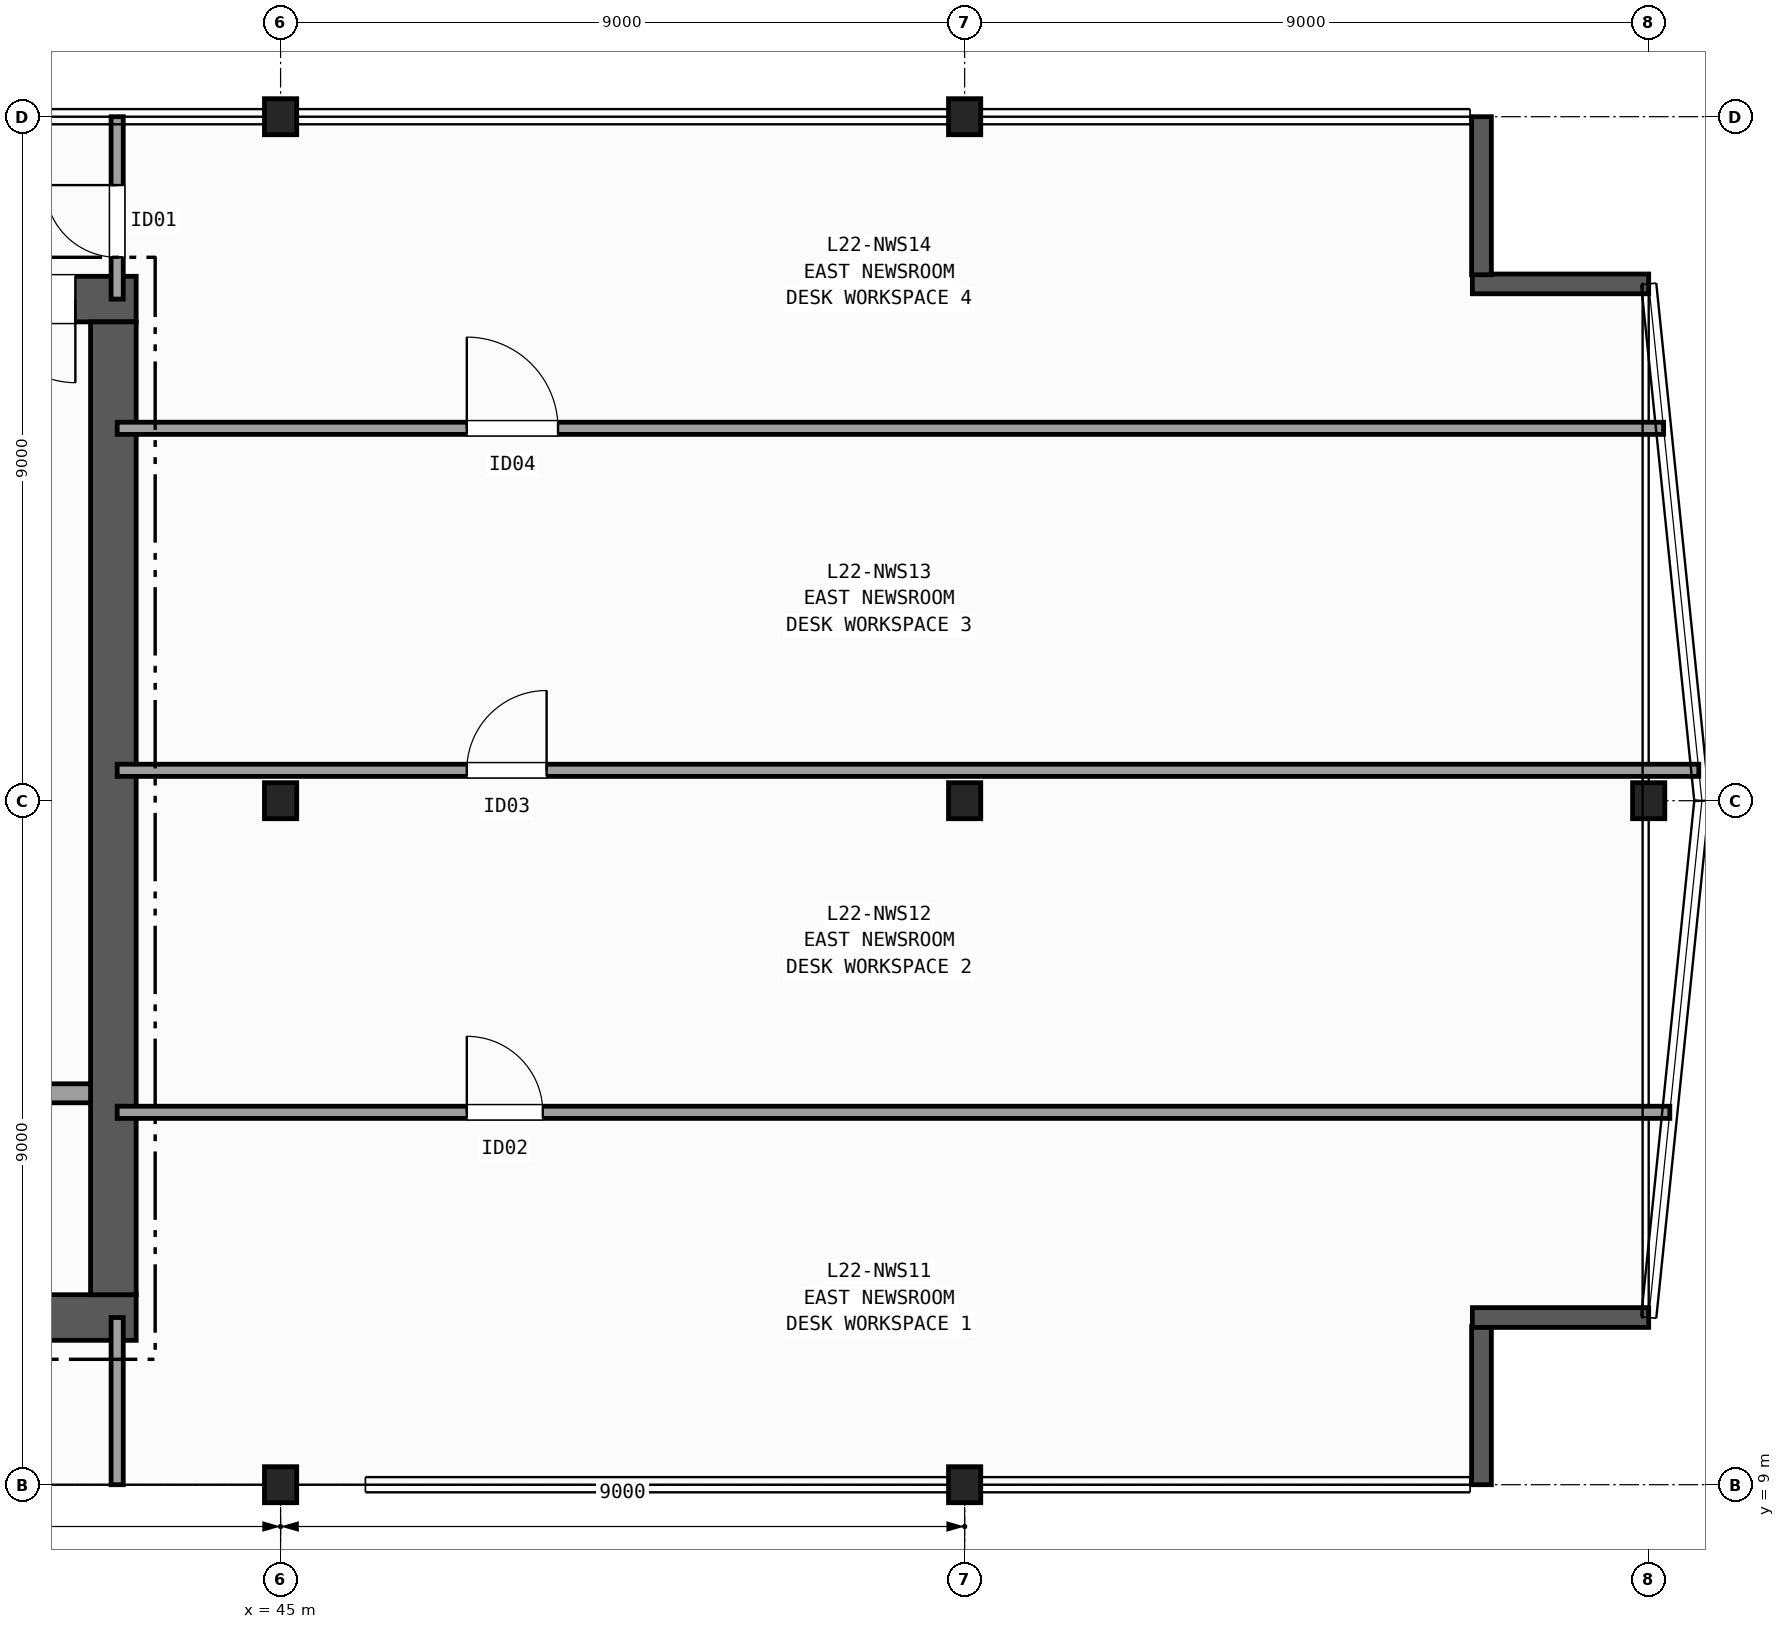
"""IFC4 building model, lengths in metres.
Left out: names, types, materials, properties, quantities, classifications, styles, units other than length and angle.
Written with IfcOpenShell. Run it as: python <this file> out.ifc"""

import sys

from ifc_helpers import new_model, si_unit, direction, frame, frame_2d, origin, origin_2d, place, context, subcontext, project, spatial, rectangle, i_section, extrude, element, fill, save


model = new_model("IFC4")
c1 = context("Model", 3, precision=1e-05, world=origin(), true_north=direction((0.0, 1.0)))
c2 = subcontext(c1, "Body", "Model", "MODEL_VIEW")
j1 = project(units=[si_unit("LENGTHUNIT", "METRE"), si_unit("PLANEANGLEUNIT", "RADIAN")], contexts=[c1])
p1 = place(None, origin())
s1 = spatial("IfcSite", under=j1, at=p1, CompositionType="ELEMENT")
p2 = place(p1, origin())
s2 = spatial("IfcBuilding", under=s1, at=p2, CompositionType="ELEMENT")
p3 = place(p2, frame((0.0, 0.0, 92.8)))
s3 = spatial("IfcBuildingStorey", under=s2, at=p3, CompositionType="ELEMENT", Elevation=92.8)
for number, where, z_axis, x_axis in (
    (1, (45.0, 9.0, 0.0), (0.0, 0.0, 1.0), (1.0, 0.0, 0.0)),
    (2, (45.0, 18.0, 0.0), (0.0, 0.0, 1.0), (1.0, 0.0, 0.0)),
    (3, (45.0, 27.0, 0.0), (0.0, 0.0, 1.0), (1.0, 0.0, 0.0)),
    (4, (54.0, 9.0, 0.0), (0.0, 0.0, 1.0), (1.0, 0.0, 0.0)),
    (5, (54.0, 18.0, 0.0), (0.0, 0.0, 1.0), (1.0, 0.0, 0.0)),
    (6, (54.0, 27.0, 0.0), (0.0, 0.0, 1.0), (1.0, 0.0, 0.0)),
    (7, (63.0, 18.0, 0.0), (0.0, 0.0, 1.0), (1.0, 0.0, 0.0)),
):
    element("IfcColumn", number, at=place(p3, frame(where, z_axis=z_axis, x_axis=x_axis)), inside=s3, PredefinedType="COLUMN", context=c2, shape_type="SweptSolid", body=[
        extrude(i_section(OverallWidth=0.424, OverallDepth=0.474, WebThickness=0.048, FlangeThickness=0.077, FilletRadius=0.015, at=origin_2d()), origin(), (0.0, 0.0, 1.0), 3.7),
    ])
p4 = place(p3, frame((60.8, 9.0, 0.0), z_axis=(0.0, 0.0, 1.0), x_axis=(0.0, 1.0, 0.0)))
e8 = element("IfcWall", 8, at=p4, inside=s3, PredefinedType="SOLIDWALL", context=c2, shape_type="SweptSolid", body=[
    extrude(rectangle(XDim=2.08, YDim=0.26, at=frame_2d((1.04, 0.0))), origin(), (0.0, 0.0, 1.0), 3.42),
])
for number, where, z_axis, x_axis in (
    (9, (60.68, 11.2, 0.0), (0.0, 0.0, 1.0), (1.0, 0.0, 0.0)),
    (10, (63.0, 24.8, 0.0), (0.0, 0.0, 1.0), (-1.0, 0.0, 0.0)),
):
    element("IfcWall", number, at=place(p3, frame(where, z_axis=z_axis, x_axis=x_axis)), inside=s3, PredefinedType="SOLIDWALL", context=c2, shape_type="SweptSolid", body=[
        extrude(rectangle(XDim=2.32, YDim=0.26, at=frame_2d((1.16, 0.0))), origin(), (0.0, 0.0, 1.0), 3.42),
    ])
p5 = place(p3, frame((60.8, 24.92, 0.0), z_axis=(0.0, 0.0, 1.0), x_axis=(0.0, 1.0, 0.0)))
e11 = element("IfcWall", 11, at=p5, inside=s3, PredefinedType="SOLIDWALL", context=c2, shape_type="SweptSolid", body=[
    extrude(rectangle(XDim=2.08, YDim=0.26, at=frame_2d((1.04, 0.0))), origin(), (0.0, 0.0, 1.0), 3.42),
])
p6 = place(p3, frame((29.1, 11.2, 0.0), z_axis=(0.0, 0.0, 1.0), x_axis=(1.0, 0.0, 0.0)))
e12 = element("IfcWall", 12, at=p6, inside=s3, PredefinedType="SHEAR", context=c2, shape_type="SweptSolid", body=[
    extrude(rectangle(XDim=14.0, YDim=0.6, at=frame_2d((7.0, 0.0))), origin(), (0.0, 0.0, 1.0), 3.42),
])
p7 = place(p3, frame((43.1, 24.6, 0.0), z_axis=(0.0, 0.0, 1.0), x_axis=(-1.0, 0.0, 0.0)))
e13 = element("IfcWall", 13, at=p7, inside=s3, PredefinedType="SHEAR", context=c2, shape_type="SweptSolid", body=[
    extrude(rectangle(XDim=14.0, YDim=0.6, at=frame_2d((7.0, 0.0))), origin(), (0.0, 0.0, 1.0), 3.42),
])
p8 = place(p7, frame((0.8, 0.0, 0.0)))
e14 = element("IfcOpeningElement", 14, at=p8, cuts=e13, PredefinedType="OPENING", context=c2, shape_type="SweptSolid", body=[
    extrude(rectangle(XDim=1.1, YDim=2.15, at=frame_2d((0.55, 1.075))), frame((0.0, 0.31, 0.0), z_axis=(0.0, -1.0, 0.0), x_axis=(1.0, 0.0, 0.0)), (0.0, 0.0, 1.0), 0.62),
])
p9 = place(p7, frame((2.75, 0.0, 0.0)))
e15 = element("IfcOpeningElement", 15, at=p9, cuts=e13, PredefinedType="OPENING", context=c2, shape_type="SweptSolid", body=[
    extrude(rectangle(XDim=0.9, YDim=2.1, at=frame_2d((0.45, 1.05))), frame((0.0, 0.31, 0.0), z_axis=(0.0, -1.0, 0.0), x_axis=(1.0, 0.0, 0.0)), (0.0, 0.0, 1.0), 0.62),
])
p10 = place(p7, frame((4.65, 0.0, 0.0)))
e16 = element("IfcOpeningElement", 16, at=p10, cuts=e13, PredefinedType="OPENING", context=c2, shape_type="SweptSolid", body=[
    extrude(rectangle(XDim=0.9, YDim=2.1, at=frame_2d((0.45, 1.05))), frame((0.0, 0.31, 0.0), z_axis=(0.0, -1.0, 0.0), x_axis=(1.0, 0.0, 0.0)), (0.0, 0.0, 1.0), 0.62),
])
p11 = place(p3, frame((42.8, 11.5, 0.0), z_axis=(0.0, 0.0, 1.0), x_axis=(0.0, 1.0, 0.0)))
e17 = element("IfcWall", 17, at=p11, inside=s3, PredefinedType="SHEAR", context=c2, shape_type="SweptSolid", body=[
    extrude(rectangle(XDim=12.8, YDim=0.6, at=frame_2d((6.4, 0.0))), origin(), (0.0, 0.0, 1.0), 3.42),
])
p12 = place(p3, frame((33.07, 14.15, 0.0), z_axis=(0.0, 0.0, 1.0), x_axis=(1.0, 0.0, 0.0)))
e18 = element("IfcWall", 18, at=p12, inside=s3, PredefinedType="PARTITIONING", context=c2, shape_type="SweptSolid", body=[
    extrude(rectangle(XDim=9.43, YDim=0.25, at=frame_2d((4.715, 0.0))), origin(), (0.0, 0.0, 1.0), 3.42),
])
p13 = place(p12, frame((0.755, 0.0, 0.0)))
e19 = element("IfcOpeningElement", 19, at=p13, cuts=e18, PredefinedType="OPENING", context=c2, shape_type="SweptSolid", body=[
    extrude(rectangle(XDim=1.15, YDim=2.15, at=frame_2d((0.575, 1.075))), frame((0.0, 0.135, 0.0), z_axis=(0.0, -1.0, 0.0), x_axis=(1.0, 0.0, 0.0)), (0.0, 0.0, 1.0), 0.27),
])
p14 = place(p12, frame((3.355, 0.0, 0.0)))
e20 = element("IfcOpeningElement", 20, at=p14, cuts=e18, PredefinedType="OPENING", context=c2, shape_type="SweptSolid", body=[
    extrude(rectangle(XDim=1.15, YDim=2.15, at=frame_2d((0.575, 1.075))), frame((0.0, 0.135, 0.0), z_axis=(0.0, -1.0, 0.0), x_axis=(1.0, 0.0, 0.0)), (0.0, 0.0, 1.0), 0.27),
])
p15 = place(p3, frame((42.85, 9.0, 0.0), z_axis=(0.0, 0.0, 1.0), x_axis=(0.0, 1.0, 0.0)))
e21 = element("IfcWall", 21, at=p15, inside=s3, PredefinedType="PARTITIONING", context=c2, shape_type="SweptSolid", body=[
    extrude(rectangle(XDim=2.2, YDim=0.16, at=frame_2d((1.1, 0.0))), origin(), (0.0, 0.0, 1.0), 2.627),
])
p16 = place(p3, frame((42.85, 24.6, 0.0), z_axis=(0.0, 0.0, 1.0), x_axis=(0.0, 1.0, 0.0)))
e22 = element("IfcWall", 22, at=p16, inside=s3, PredefinedType="PARTITIONING", context=c2, shape_type="SweptSolid", body=[
    extrude(rectangle(XDim=2.4, YDim=0.16, at=frame_2d((1.2, 0.0))), origin(), (0.0, 0.0, 1.0), 2.627),
])
p17 = place(p16, frame((0.55, 0.0, 0.0)))
e23 = element("IfcOpeningElement", 23, at=p17, cuts=e22, PredefinedType="OPENING", context=c2, shape_type="SweptSolid", body=[
    extrude(rectangle(XDim=0.95, YDim=2.1, at=frame_2d((0.475, 1.05))), frame((0.0, 0.09, 0.0), z_axis=(0.0, -1.0, 0.0), x_axis=(1.0, 0.0, 0.0)), (0.0, 0.0, 1.0), 0.18),
])
p18 = place(p3, frame((42.85, 13.9, 0.0), z_axis=(0.0, 0.0, 1.0), x_axis=(1.0, 0.0, 0.0)))
e24 = element("IfcWall", 24, at=p18, inside=s3, PredefinedType="PARTITIONING", context=c2, shape_type="SweptSolid", body=[
    extrude(rectangle(XDim=20.428, YDim=0.16, at=frame_2d((10.214, 0.0))), origin(), (0.0, 0.0, 1.0), 3.42),
])
p19 = place(p18, frame((4.6, 0.0, 0.0)))
e25 = element("IfcOpeningElement", 25, at=p19, cuts=e24, PredefinedType="OPENING", context=c2, shape_type="SweptSolid", body=[
    extrude(rectangle(XDim=1.0, YDim=2.1, at=frame_2d((0.5, 1.05))), frame((0.0, 0.09, 0.0), z_axis=(0.0, -1.0, 0.0), x_axis=(1.0, 0.0, 0.0)), (0.0, 0.0, 1.0), 0.18),
])
p20 = place(p3, frame((42.85, 18.4, 0.0), z_axis=(0.0, 0.0, 1.0), x_axis=(1.0, 0.0, 0.0)))
e26 = element("IfcWall", 26, at=p20, inside=s3, PredefinedType="PARTITIONING", context=c2, shape_type="SweptSolid", body=[
    extrude(rectangle(XDim=20.809, YDim=0.16, at=frame_2d((10.404, 0.0))), origin(), (0.0, 0.0, 1.0), 3.42),
])
p21 = place(p20, frame((4.6, 0.0, 0.0)))
e27 = element("IfcOpeningElement", 27, at=p21, cuts=e26, PredefinedType="OPENING", context=c2, shape_type="SweptSolid", body=[
    extrude(rectangle(XDim=1.05, YDim=2.15, at=frame_2d((0.525, 1.075))), frame((0.0, 0.09, 0.0), z_axis=(0.0, -1.0, 0.0), x_axis=(1.0, 0.0, 0.0)), (0.0, 0.0, 1.0), 0.18),
])
p22 = place(p3, frame((42.85, 22.9, 0.0), z_axis=(0.0, 0.0, 1.0), x_axis=(1.0, 0.0, 0.0)))
e28 = element("IfcWall", 28, at=p22, inside=s3, PredefinedType="PARTITIONING", context=c2, shape_type="SweptSolid", body=[
    extrude(rectangle(XDim=20.346, YDim=0.16, at=frame_2d((10.173, 0.0))), origin(), (0.0, 0.0, 1.0), 3.42),
])
p23 = place(p22, frame((4.6, 0.0, 0.0)))
e29 = element("IfcOpeningElement", 29, at=p23, cuts=e28, PredefinedType="OPENING", context=c2, shape_type="SweptSolid", body=[
    extrude(rectangle(XDim=1.2, YDim=2.15, at=frame_2d((0.6, 1.075))), frame((0.0, 0.09, 0.0), z_axis=(0.0, -1.0, 0.0), x_axis=(1.0, 0.0, 0.0)), (0.0, 0.0, 1.0), 0.18),
])
p24 = place(p8, origin())
e30 = element("IfcDoor", 30, at=p24, inside=s3, OperationType="SINGLE_SWING_LEFT", PredefinedType="DOOR", context=c2, shape_type="SweptSolid", body=[
    extrude(rectangle(XDim=1.1, YDim=2.15, at=frame_2d((0.55, 1.075))), frame((0.0, 0.025, 0.0), z_axis=(0.0, -1.0, 0.0), x_axis=(1.0, 0.0, 0.0)), (0.0, 0.0, 1.0), 0.05),
])
fill(e14, e30)
p25 = place(p17, origin())
e31 = element("IfcDoor", 31, at=p25, inside=s3, OperationType="SINGLE_SWING_RIGHT", PredefinedType="DOOR", context=c2, shape_type="SweptSolid", body=[
    extrude(rectangle(XDim=0.95, YDim=2.1, at=frame_2d((0.475, 1.05))), frame((0.0, 0.025, 0.0), z_axis=(0.0, -1.0, 0.0), x_axis=(1.0, 0.0, 0.0)), (0.0, 0.0, 1.0), 0.05),
])
fill(e23, e31)
p26 = place(p19, origin())
e32 = element("IfcDoor", 32, at=p26, inside=s3, OperationType="SINGLE_SWING_LEFT", PredefinedType="DOOR", context=c2, shape_type="SweptSolid", body=[
    extrude(rectangle(XDim=1.0, YDim=2.1, at=frame_2d((0.5, 1.05))), frame((0.0, 0.025, 0.0), z_axis=(0.0, -1.0, 0.0), x_axis=(1.0, 0.0, 0.0)), (0.0, 0.0, 1.0), 0.05),
])
fill(e25, e32)
p27 = place(p21, origin())
e33 = element("IfcDoor", 33, at=p27, inside=s3, OperationType="SINGLE_SWING_RIGHT", PredefinedType="DOOR", context=c2, shape_type="SweptSolid", body=[
    extrude(rectangle(XDim=1.05, YDim=2.15, at=frame_2d((0.525, 1.075))), frame((0.0, 0.025, 0.0), z_axis=(0.0, -1.0, 0.0), x_axis=(1.0, 0.0, 0.0)), (0.0, 0.0, 1.0), 0.05),
])
fill(e27, e33)
p28 = place(p23, origin())
e34 = element("IfcDoor", 34, at=p28, inside=s3, OperationType="SINGLE_SWING_LEFT", PredefinedType="DOOR", context=c2, shape_type="SweptSolid", body=[
    extrude(rectangle(XDim=1.2, YDim=2.15, at=frame_2d((0.6, 1.075))), frame((0.0, 0.025, 0.0), z_axis=(0.0, -1.0, 0.0), x_axis=(1.0, 0.0, 0.0)), (0.0, 0.0, 1.0), 0.05),
])
fill(e29, e34)
save(model, sys.argv[1])
